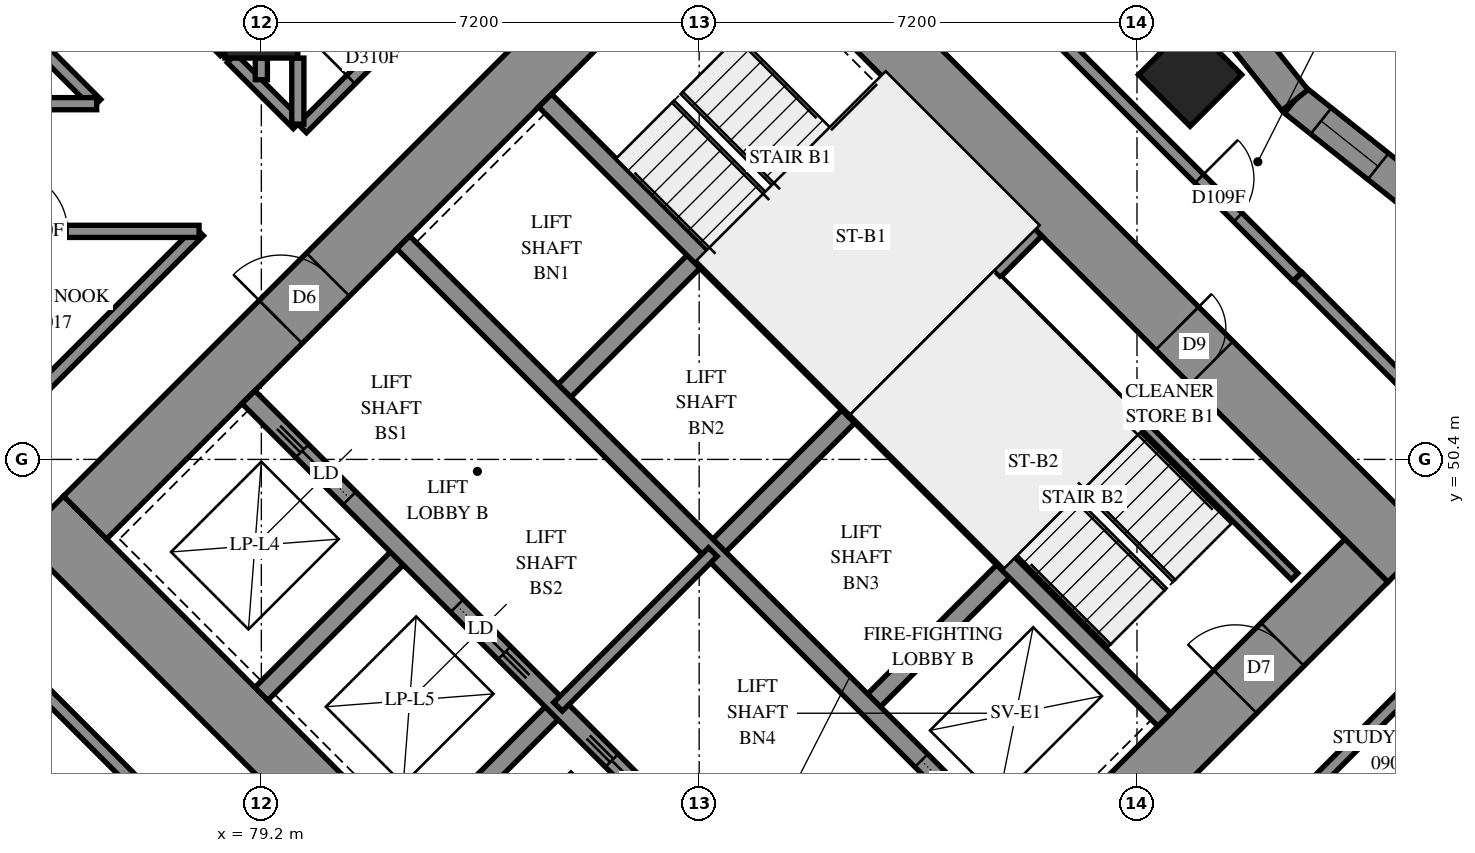
"""IFC4 building model, lengths in metres.
Left out: names, types, materials, properties, quantities, classifications, styles, units other than length and angle.
Written with IfcOpenShell. Run it as: python <this file> out.ifc"""

import sys

from ifc_helpers import new_model, si_unit, direction, frame, frame_2d, origin, origin_2d, place, context, subcontext, project, spatial, polyline, rectangle, outline, extrude, element, fill, save


model = new_model("IFC4")
c1 = context("Model", 3, precision=1e-05, world=origin(), true_north=direction((0.0, 1.0)))
c2 = subcontext(c1, "Body", "Model", "MODEL_VIEW")
j1 = project(units=[si_unit("LENGTHUNIT", "METRE"), si_unit("PLANEANGLEUNIT", "RADIAN")], contexts=[c1])
p1 = place(None, origin())
s1 = spatial("IfcSite", under=j1, at=p1, CompositionType="ELEMENT")
p2 = place(p1, origin())
s2 = spatial("IfcBuilding", under=s1, at=p2, CompositionType="ELEMENT")
p3 = place(p2, frame((0.0, 0.0, 37.2)))
s3 = spatial("IfcBuildingStorey", under=s2, at=p3, CompositionType="ELEMENT", Elevation=37.2)
for number, where, z_axis, x_axis in (
    (1, (79.2, 57.6, 0.0), (0.0, 0.0, 1.0), (1.0, 0.0, 0.0)),
    (2, (94.474, 56.727, 0.0), (0.0, 0.0, 1.0), (0.707, -0.707, 0.0)),
):
    element("IfcColumn", number, at=place(p3, frame(where, z_axis=z_axis, x_axis=x_axis)), inside=s3, PredefinedType="COLUMN", context=c2, shape_type="SweptSolid", body=[
        extrude(rectangle(XDim=1.2, YDim=1.2, at=origin_2d()), origin(), (0.0, 0.0, 1.0), 3.1),
    ])
p4 = place(p3, frame((75.594, 49.443, -0.3), z_axis=(0.0, 0.0, 1.0), x_axis=(0.7071037324, -0.70710983, 0.0)))
e3 = element("IfcWall", 3, at=p4, inside=s3, PredefinedType="SHEAR", context=c2, shape_type="SweptSolid", body=[
    extrude(rectangle(XDim=16.4, YDim=1.0, at=frame_2d((8.2, 0.0))), origin(), (0.0, 0.0, 1.0), 2.7),
])
p5 = place(p3, frame((86.483, 60.333, -0.3), z_axis=(0.0, 0.0, 1.0), x_axis=(0.70710983, -0.7071037324, 0.0)))
e4 = element("IfcWall", 4, at=p5, inside=s3, PredefinedType="SHEAR", context=c2, shape_type="SweptSolid", body=[
    extrude(rectangle(XDim=16.4, YDim=1.0, at=frame_2d((8.2, 0.0))), origin(), (0.0, 0.0, 1.0), 2.7),
])
p6 = place(p5, frame((11.0, 0.0, 0.3)))
e5 = element("IfcOpeningElement", 5, at=p6, cuts=e4, PredefinedType="OPENING", context=c2, shape_type="SweptSolid", body=[
    extrude(rectangle(XDim=0.8, YDim=2.1, at=frame_2d((0.4, 1.05))), frame((0.0, 0.51, 0.0), z_axis=(0.0, -1.0, 0.0), x_axis=(1.0, 0.0, 0.0)), (0.0, 0.0, 1.0), 1.02),
])
p7 = place(p3, frame((76.301, 49.443, -0.3), z_axis=(0.0, 0.0, 1.0), x_axis=(0.7071067812, 0.7071067812, 0.0)))
e6 = element("IfcWall", 6, at=p7, inside=s3, PredefinedType="SHEAR", context=c2, shape_type="SweptSolid", body=[
    extrude(rectangle(XDim=14.4, YDim=1.0, at=frame_2d((7.2, 0.0))), origin(), (0.0, 0.0, 1.0), 2.7),
])
p8 = place(p7, frame((4.55, 0.0, 0.3)))
e7 = element("IfcOpeningElement", 7, at=p8, cuts=e6, PredefinedType="OPENING", context=c2, shape_type="SweptSolid", body=[
    extrude(rectangle(XDim=1.1, YDim=2.1, at=frame_2d((0.55, 1.05))), frame((0.0, 0.51, 0.0), z_axis=(0.0, -1.0, 0.0), x_axis=(1.0, 0.0, 0.0)), (0.0, 0.0, 1.0), 1.02),
])
p9 = place(p7, frame((11.35, 0.0, 0.3)))
e8 = element("IfcOpeningElement", 8, at=p9, cuts=e6, PredefinedType="OPENING", context=c2, shape_type="SweptSolid", body=[
    extrude(rectangle(XDim=1.1, YDim=2.1, at=frame_2d((0.55, 1.05))), frame((0.0, 0.51, 0.0), z_axis=(0.0, -1.0, 0.0), x_axis=(1.0, 0.0, 0.0)), (0.0, 0.0, 1.0), 1.02),
])
p10 = place(p3, frame((87.19, 38.554, -0.3), z_axis=(0.0, 0.0, 1.0), x_axis=(0.707103309, 0.7071102534, 0.0)))
e9 = element("IfcWall", 9, at=p10, inside=s3, PredefinedType="SHEAR", context=c2, shape_type="SweptSolid", body=[
    extrude(rectangle(XDim=14.4, YDim=1.0, at=frame_2d((7.2, 0.0))), origin(), (0.0, 0.0, 1.0), 2.7),
])
p11 = place(p10, frame((4.55, 0.0, 0.3)))
e10 = element("IfcOpeningElement", 10, at=p11, cuts=e9, PredefinedType="OPENING", context=c2, shape_type="SweptSolid", body=[
    extrude(rectangle(XDim=1.1, YDim=2.1, at=frame_2d((0.55, 1.05))), frame((0.0, 0.51, 0.0), z_axis=(0.0, -1.0, 0.0), x_axis=(1.0, 0.0, 0.0)), (0.0, 0.0, 1.0), 1.02),
])
p12 = place(p10, frame((11.35, 0.0, 0.3)))
e11 = element("IfcOpeningElement", 11, at=p12, cuts=e9, PredefinedType="OPENING", context=c2, shape_type="SweptSolid", body=[
    extrude(rectangle(XDim=1.1, YDim=2.1, at=frame_2d((0.55, 1.05))), frame((0.0, 0.51, 0.0), z_axis=(0.0, -1.0, 0.0), x_axis=(1.0, 0.0, 0.0)), (0.0, 0.0, 1.0), 1.02),
])
for number, where, z_axis, x_axis in (
    (12, (79.2, 46.544, 0.0), (0.0, 0.0, 1.0), (0.707, 0.707, 0.0)),
    (13, (84.079, 51.423, 0.0), (0.0, 0.0, 1.0), (0.707, 0.707, 0.0)),
):
    element("IfcWall", number, at=place(p3, frame(where, z_axis=z_axis, x_axis=x_axis)), inside=s3, PredefinedType="SOLIDWALL", context=c2, shape_type="SweptSolid", body=[
        extrude(rectangle(XDim=3.3, YDim=0.3, at=frame_2d((1.65, 0.0))), origin(), (0.0, 0.0, 1.0), 3.1),
    ])
p13 = place(p3, frame((81.746, 43.999, 0.0), z_axis=(0.0, 0.0, 1.0), x_axis=(0.7071067812, 0.7071067812, 0.0)))
e14 = element("IfcWall", 14, at=p13, inside=s3, PredefinedType="SOLIDWALL", context=c2, shape_type="SweptSolid", body=[
    extrude(rectangle(XDim=3.3, YDim=0.3, at=frame_2d((1.65, 0.0))), origin(), (0.0, 0.0, 1.0), 3.1),
])
for number, where, z_axis, x_axis in (
    (15, (86.625, 48.878, 0.0), (0.0, 0.0, 1.0), (0.707, 0.707, 0.0)),
    (16, (89.17, 46.332, 0.0), (0.0, 0.0, 1.0), (0.707, 0.707, 0.0)),
):
    element("IfcWall", number, at=place(p3, frame(where, z_axis=z_axis, x_axis=x_axis)), inside=s3, PredefinedType="SOLIDWALL", context=c2, shape_type="SweptSolid", body=[
        extrude(rectangle(XDim=3.3, YDim=0.3, at=frame_2d((1.65, 0.0))), origin(), (0.0, 0.0, 1.0), 3.1),
    ])
p14 = place(p3, frame((78.988, 51.423, 0.0), z_axis=(0.0, 0.0, 1.0), x_axis=(0.7071067812, -0.7071067812, 0.0)))
e17 = element("IfcWall", 17, at=p14, inside=s3, PredefinedType="SOLIDWALL", context=c2, shape_type="SweptSolid", body=[
    extrude(rectangle(XDim=14.4, YDim=0.3, at=frame_2d((7.2, 0.0))), origin(), (0.0, 0.0, 1.0), 3.1),
])
p15 = place(p14, frame((1.25, 0.0, 0.0)))
e18 = element("IfcOpeningElement", 18, at=p15, cuts=e17, PredefinedType="OPENING", context=c2, shape_type="SweptSolid", body=[
    extrude(rectangle(XDim=1.1, YDim=2.1, at=frame_2d((0.55, 1.05))), frame((0.0, 0.16, 0.0), z_axis=(0.0, -1.0, 0.0), x_axis=(1.0, 0.0, 0.0)), (0.0, 0.0, 1.0), 0.32),
])
p16 = place(p14, frame((4.85, 0.0, 0.0)))
e19 = element("IfcOpeningElement", 19, at=p16, cuts=e17, PredefinedType="OPENING", context=c2, shape_type="SweptSolid", body=[
    extrude(rectangle(XDim=1.1, YDim=2.1, at=frame_2d((0.55, 1.05))), frame((0.0, 0.16, 0.0), z_axis=(0.0, -1.0, 0.0), x_axis=(1.0, 0.0, 0.0)), (0.0, 0.0, 1.0), 0.32),
])
p17 = place(p14, frame((8.45, 0.0, 0.0)))
e20 = element("IfcOpeningElement", 20, at=p17, cuts=e17, PredefinedType="OPENING", context=c2, shape_type="SweptSolid", body=[
    extrude(rectangle(XDim=1.1, YDim=2.1, at=frame_2d((0.55, 1.05))), frame((0.0, 0.16, 0.0), z_axis=(0.0, -1.0, 0.0), x_axis=(1.0, 0.0, 0.0)), (0.0, 0.0, 1.0), 0.32),
])
p18 = place(p14, frame((12.05, 0.0, 0.0)))
e21 = element("IfcOpeningElement", 21, at=p18, cuts=e17, PredefinedType="OPENING", context=c2, shape_type="SweptSolid", body=[
    extrude(rectangle(XDim=1.1, YDim=2.1, at=frame_2d((0.55, 1.05))), frame((0.0, 0.16, 0.0), z_axis=(0.0, -1.0, 0.0), x_axis=(1.0, 0.0, 0.0)), (0.0, 0.0, 1.0), 0.32),
])
p19 = place(p3, frame((81.534, 53.969, 0.0), z_axis=(0.0, 0.0, 1.0), x_axis=(0.707103309, -0.7071102534, 0.0)))
e22 = element("IfcWall", 22, at=p19, inside=s3, PredefinedType="SOLIDWALL", context=c2, shape_type="SweptSolid", body=[
    extrude(rectangle(XDim=14.4, YDim=0.3, at=frame_2d((7.2, 0.0))), origin(), (0.0, 0.0, 1.0), 3.1),
])
p20 = place(p19, frame((12.05, 0.0, 0.0)))
e23 = element("IfcOpeningElement", 23, at=p20, cuts=e22, PredefinedType="OPENING", context=c2, shape_type="SweptSolid", body=[
    extrude(rectangle(XDim=1.1, YDim=2.1, at=frame_2d((0.55, 1.05))), frame((0.0, 0.16, 0.0), z_axis=(0.0, -1.0, 0.0), x_axis=(1.0, 0.0, 0.0)), (0.0, 0.0, 1.0), 0.32),
])
for number, where, z_axis, x_axis in (
    (24, (83.867, 56.302, 0.0), (0.0, 0.0, 1.0), (0.707, -0.707, 0.0)),
    (25, (88.958, 51.211, 0.0), (0.0, 0.0, 1.0), (0.707, -0.707, 0.0)),
):
    element("IfcWall", number, at=place(p3, frame(where, z_axis=z_axis, x_axis=x_axis)), inside=s3, PredefinedType="SOLIDWALL", context=c2, shape_type="SweptSolid", body=[
        extrude(rectangle(XDim=7.2, YDim=0.3, at=frame_2d((3.6, 0.0))), origin(), (0.0, 0.0, 1.0), 3.1),
    ])
p21 = place(p3, frame((88.958, 51.211, 0.0), z_axis=(0.0, 0.0, 1.0), x_axis=(0.7071067812, 0.7071067812, 0.0)))
e26 = element("IfcWall", 26, at=p21, inside=s3, PredefinedType="SOLIDWALL", context=c2, shape_type="SweptSolid", body=[
    extrude(rectangle(XDim=4.2, YDim=0.3, at=frame_2d((2.1, 0.0))), origin(), (0.0, 0.0, 1.0), 3.1),
])
p22 = place(p3, frame((98.9, 54.158, 0.0), z_axis=(0.0, 0.0, 1.0), x_axis=(-0.7826029777, 0.6225211477, 0.0)))
e27 = element("IfcWall", 27, at=p22, inside=s3, PredefinedType="SOLIDWALL", context=c2, shape_type="SweptSolid", body=[
    extrude(outline(polyline([(-0.031, -0.275), (3.423, -0.275), (3.485, 0.275), (0.031, 0.275), (-0.031, -0.275)])), origin(), (0.0, 0.0, 1.0), 3.1),
])
p23 = place(p22, frame((1.704, 0.0, 0.5)))
e28 = element("IfcOpeningElement", 28, at=p23, cuts=e27, PredefinedType="OPENING", context=c2, shape_type="SweptSolid", body=[
    extrude(rectangle(XDim=1.2, YDim=2.45, at=frame_2d((0.6, 1.225))), frame((0.0, 0.285, 0.0), z_axis=(0.0, -1.0, 0.0), x_axis=(1.0, 0.0, 0.0)), (0.0, 0.0, 1.0), 0.57),
])
p24 = place(p3, frame((96.197, 56.308, 0.0), z_axis=(0.0, 0.0, 1.0), x_axis=(-0.6225070424, 0.7826141976, 0.0)))
e29 = element("IfcWall", 29, at=p24, inside=s3, PredefinedType="SOLIDWALL", context=c2, shape_type="SweptSolid", body=[
    extrude(outline(polyline([(0.031, -0.275), (3.485, -0.275), (3.423, 0.275), (-0.031, 0.275), (0.031, -0.275)])), origin(), (0.0, 0.0, 1.0), 3.1),
])
p25 = place(p24, frame((1.773, 0.0, 0.5)))
e30 = element("IfcOpeningElement", 30, at=p25, cuts=e29, PredefinedType="OPENING", context=c2, shape_type="SweptSolid", body=[
    extrude(rectangle(XDim=1.2, YDim=2.45, at=frame_2d((0.6, 1.225))), frame((0.0, 0.285, 0.0), z_axis=(0.0, -1.0, 0.0), x_axis=(1.0, 0.0, 0.0)), (0.0, 0.0, 1.0), 0.57),
])
p26 = place(p3, frame((91.313, 53.354, 0.0), z_axis=(0.0, 0.0, 1.0), x_axis=(0.7071140275, -0.7070995348, 0.0)))
e31 = element("IfcWall", 31, at=p26, inside=s3, PredefinedType="PARTITIONING", context=c2, shape_type="SweptSolid", body=[
    extrude(rectangle(XDim=6.9, YDim=0.15, at=frame_2d((3.45, 0.0))), origin(), (0.0, 0.0, 1.0), 3.1),
])
p27 = place(p3, frame((84.079, 46.332, 0.0), z_axis=(0.0, 0.0, 1.0), x_axis=(0.7071067812, 0.7071067812, 0.0)))
e32 = element("IfcWall", 32, at=p27, inside=s3, PredefinedType="PARTITIONING", context=c2, shape_type="SweptSolid", body=[
    extrude(rectangle(XDim=3.6, YDim=0.2, at=frame_2d((1.8, 0.0))), origin(), (0.0, 0.0, 1.0), 3.1),
])
p28 = place(p3, frame((94.367, 41.349, 0.0), z_axis=(0.0, 0.0, 1.0), x_axis=(0.7071109931, 0.7071025693, 0.0)))
e33 = element("IfcWall", 33, at=p28, inside=s3, PredefinedType="PARTITIONING", context=c2, shape_type="SweptSolid", body=[
    extrude(rectangle(XDim=11.871, YDim=0.2, at=frame_2d((5.936, 0.0))), origin(), (0.0, 0.0, 1.0), 3.1),
])
p29 = place(p3, frame((79.871, 55.843, 0.0), z_axis=(0.0, 0.0, 1.0), x_axis=(0.7071067812, 0.7071067812, 0.0)))
e34 = element("IfcWall", 34, at=p29, inside=s3, PredefinedType="PARTITIONING", context=c2, shape_type="SweptSolid", body=[
    extrude(rectangle(XDim=9.85, YDim=0.2, at=frame_2d((4.925, 0.0))), origin(), (0.0, 0.0, 1.0), 3.1),
])
p30 = place(p29, frame((1.135, 0.0, 0.0)))
e35 = element("IfcOpeningElement", 35, at=p30, cuts=e34, PredefinedType="OPENING", context=c2, shape_type="SweptSolid", body=[
    extrude(rectangle(XDim=1.0, YDim=2.1, at=frame_2d((0.5, 1.05))), frame((0.0, 0.11, 0.0), z_axis=(0.0, -1.0, 0.0), x_axis=(1.0, 0.0, 0.0)), (0.0, 0.0, 1.0), 0.22),
])
p31 = place(p3, frame((93.59, 42.126, 0.0), z_axis=(0.0, 0.0, 1.0), x_axis=(0.7071067812, 0.7071067812, 0.0)))
e36 = element("IfcWall", 36, at=p31, inside=s3, PredefinedType="PARTITIONING", context=c2, shape_type="SweptSolid", body=[
    extrude(rectangle(XDim=9.849, YDim=0.2, at=frame_2d((4.924, 0.0))), origin(), (0.0, 0.0, 1.0), 3.1),
])
p32 = place(p31, frame((0.148, 0.0, 0.0)))
e37 = element("IfcOpeningElement", 37, at=p32, cuts=e36, PredefinedType="OPENING", context=c2, shape_type="SweptSolid", body=[
    extrude(rectangle(XDim=1.0, YDim=2.1, at=frame_2d((0.5, 1.05))), frame((0.0, 0.11, 0.0), z_axis=(0.0, -1.0, 0.0), x_axis=(1.0, 0.0, 0.0)), (0.0, 0.0, 1.0), 0.22),
])
p33 = place(p3, frame((89.451, 60.189, 0.0), z_axis=(0.0, 0.0, 1.0), x_axis=(0.7071796965, -0.7070338583, 0.0)))
e38 = element("IfcWall", 38, at=p33, inside=s3, PredefinedType="PARTITIONING", context=c2, shape_type="SweptSolid", body=[
    extrude(rectangle(XDim=9.6, YDim=0.2, at=frame_2d((4.8, 0.0))), origin(), (0.0, 0.0, 1.0), 3.1),
])
p34 = place(p33, frame((7.315, 0.0, 0.0)))
e39 = element("IfcOpeningElement", 39, at=p34, cuts=e38, PredefinedType="OPENING", context=c2, shape_type="SweptSolid", body=[
    extrude(rectangle(XDim=0.9, YDim=2.1, at=frame_2d((0.45, 1.05))), frame((0.0, 0.11, 0.0), z_axis=(0.0, -1.0, 0.0), x_axis=(1.0, 0.0, 0.0)), (0.0, 0.0, 1.0), 0.22),
])
p35 = place(p3, frame((74.773, 60.935, 0.0), z_axis=(0.0, 0.0, 1.0), x_axis=(0.7071067812, -0.7071067812, 0.0)))
e40 = element("IfcWall", 40, at=p35, inside=s3, PredefinedType="PARTITIONING", context=c2, shape_type="SweptSolid", body=[
    extrude(rectangle(XDim=5.408, YDim=0.2, at=frame_2d((2.704, 0.0))), origin(), (0.0, 0.0, 1.0), 3.1),
])
p36 = place(p3, frame((74.517, 50.489, 0.0), z_axis=(0.0, 0.0, 1.0), x_axis=(0.7071067812, 0.7071067812, 0.0)))
e41 = element("IfcWall", 41, at=p36, inside=s3, PredefinedType="PARTITIONING", context=c2, shape_type="SweptSolid", body=[
    extrude(rectangle(XDim=5.176, YDim=0.2, at=frame_2d((2.588, 0.0))), origin(), (0.0, 0.0, 1.0), 3.1),
])
p37 = place(p3, frame((74.505, 47.697, 0.0), z_axis=(0.0, 0.0, 1.0), x_axis=(0.7071067812, -0.7071067812, 0.0)))
e42 = element("IfcWall", 42, at=p37, inside=s3, PredefinedType="PARTITIONING", context=c2, shape_type="SweptSolid", body=[
    extrude(rectangle(XDim=4.019, YDim=0.2, at=frame_2d((2.01, 0.0))), origin(), (0.0, 0.0, 1.0), 3.1),
])
p38 = place(p37, frame((0.215, 0.0, 0.0)))
e43 = element("IfcOpeningElement", 43, at=p38, cuts=e42, PredefinedType="OPENING", context=c2, shape_type="SweptSolid", body=[
    extrude(rectangle(XDim=1.0, YDim=2.1, at=frame_2d((0.5, 1.05))), frame((0.0, 0.11, 0.0), z_axis=(0.0, -1.0, 0.0), x_axis=(1.0, 0.0, 0.0)), (0.0, 0.0, 1.0), 0.22),
])
p39 = place(p3, frame((74.51, 54.15, 0.0), z_axis=(0.0, 0.0, 1.0), x_axis=(1.0, 0.0, 0.0)))
e44 = element("IfcWall", 44, at=p39, inside=s3, PredefinedType="PARTITIONING", context=c2, shape_type="SweptSolid", body=[
    extrude(rectangle(XDim=3.666, YDim=0.2, at=frame_2d((1.833, 0.0))), origin(), (0.0, 0.0, 1.0), 3.1),
])
p40 = place(p39, frame((0.502, 0.0, 0.0)))
e45 = element("IfcOpeningElement", 45, at=p40, cuts=e44, PredefinedType="OPENING", context=c2, shape_type="SweptSolid", body=[
    extrude(rectangle(XDim=1.0, YDim=2.1, at=frame_2d((0.5, 1.05))), frame((0.0, 0.11, 0.0), z_axis=(0.0, -1.0, 0.0), x_axis=(1.0, 0.0, 0.0)), (0.0, 0.0, 1.0), 0.22),
])
p41 = place(p3, frame((96.244, 53.406, 0.0), z_axis=(0.0, 0.0, 1.0), x_axis=(0.7068288851, -0.7073845681, 0.0)))
e46 = element("IfcWall", 46, at=p41, inside=s3, PredefinedType="PARTITIONING", context=c2, shape_type="SweptSolid", body=[
    extrude(rectangle(XDim=3.599, YDim=0.2, at=frame_2d((1.8, 0.0))), origin(), (0.0, 0.0, 1.0), 3.1),
])
p42 = place(p3, frame((74.697, 58.041, 0.0), z_axis=(0.0, 0.0, 1.0), x_axis=(0.7071067812, -0.7071067812, 0.0)))
e47 = element("IfcWall", 47, at=p42, inside=s3, PredefinedType="PARTITIONING", context=c2, shape_type="SweptSolid", body=[
    extrude(rectangle(XDim=2.534, YDim=0.2, at=frame_2d((1.267, 0.0))), origin(), (0.0, 0.0, 1.0), 3.1),
])
p43 = place(p3, frame((74.51, 56.25, 0.0), z_axis=(0.0, 0.0, 1.0), x_axis=(1.0, 0.0, 0.0)))
e48 = element("IfcWall", 48, at=p43, inside=s3, PredefinedType="PARTITIONING", context=c2, shape_type="SweptSolid", body=[
    extrude(rectangle(XDim=1.982, YDim=0.2, at=frame_2d((0.991, 0.0))), origin(), (0.0, 0.0, 1.0), 3.1),
])
p44 = place(p3, frame((78.711, 56.997, 0.0), z_axis=(0.0, 0.0, 1.0), x_axis=(0.7071067812, -0.7071067812, 0.0)))
e49 = element("IfcWall", 49, at=p44, inside=s3, PredefinedType="PARTITIONING", context=c2, shape_type="SweptSolid", body=[
    extrude(rectangle(XDim=1.536, YDim=0.2, at=frame_2d((0.768, 0.0))), origin(), (0.0, 0.0, 1.0), 3.1),
])
p45 = place(p3, frame((79.8, 55.914, 0.0), z_axis=(0.0, 0.0, 1.0), x_axis=(0.0, 1.0, 0.0)))
e50 = element("IfcWall", 50, at=p45, inside=s3, PredefinedType="PARTITIONING", context=c2, shape_type="SweptSolid", body=[
    extrude(rectangle(XDim=1.086, YDim=0.2, at=frame_2d((0.543, 0.0))), origin(), (0.0, 0.0, 1.0), 3.1),
])
p46 = place(p3, frame((79.2, 56.644, 0.0), z_axis=(0.0, 0.0, 1.0), x_axis=(0.0, 1.0, 0.0)))
e51 = element("IfcWall", 51, at=p46, inside=s3, PredefinedType="PARTITIONING", context=c2, shape_type="SweptSolid", body=[
    extrude(rectangle(XDim=0.356, YDim=0.2, at=frame_2d((0.178, 0.0))), origin(), (0.0, 0.0, 1.0), 3.1),
])
p47 = place(p23, origin())
e52 = element("IfcWindow", 52, at=p47, inside=s3, PartitioningType="SINGLE_PANEL", PredefinedType="WINDOW", context=c2, shape_type="SweptSolid", body=[
    extrude(rectangle(XDim=1.2, YDim=2.45, at=frame_2d((0.6, 1.225))), frame((0.0, 0.155, 0.0), z_axis=(0.0, -1.0, 0.0), x_axis=(1.0, 0.0, 0.0)), (0.0, 0.0, 1.0), 0.06),
])
fill(e28, e52)
p48 = place(p6, origin())
e53 = element("IfcDoor", 53, at=p48, inside=s3, OperationType="SINGLE_SWING_RIGHT", PredefinedType="DOOR", context=c2, shape_type="SweptSolid", body=[
    extrude(rectangle(XDim=0.8, YDim=2.1, at=frame_2d((0.4, 1.05))), frame((0.0, -0.44, 0.0), z_axis=(0.0, -1.0, 0.0), x_axis=(1.0, 0.0, 0.0)), (0.0, 0.0, 1.0), 0.05),
])
fill(e5, e53)
p49 = place(p8, origin())
e54 = element("IfcDoor", 54, at=p49, inside=s3, OperationType="DOUBLE_DOOR_SINGLE_SWING", PredefinedType="DOOR", context=c2, shape_type="SweptSolid", body=[
    extrude(rectangle(XDim=1.1, YDim=2.1, at=frame_2d((0.55, 1.05))), frame((0.0, 0.025, 0.0), z_axis=(0.0, -1.0, 0.0), x_axis=(1.0, 0.0, 0.0)), (0.0, 0.0, 1.0), 0.05),
])
fill(e7, e54)
p50 = place(p12, origin())
e55 = element("IfcDoor", 55, at=p50, inside=s3, OperationType="SINGLE_SWING_RIGHT", PredefinedType="DOOR", context=c2, shape_type="SweptSolid", body=[
    extrude(rectangle(XDim=1.1, YDim=2.1, at=frame_2d((0.55, 1.05))), frame((0.0, 0.025, 0.0), z_axis=(0.0, -1.0, 0.0), x_axis=(1.0, 0.0, 0.0)), (0.0, 0.0, 1.0), 0.05),
])
fill(e11, e55)
p51 = place(p15, origin())
e56 = element("IfcDoor", 56, at=p51, inside=s3, OperationType="SLIDING_TO_LEFT", PredefinedType="DOOR", context=c2, shape_type="SweptSolid", body=[
    extrude(rectangle(XDim=1.1, YDim=2.1, at=frame_2d((0.55, 1.05))), frame((0.0, 0.025, 0.0), z_axis=(0.0, -1.0, 0.0), x_axis=(1.0, 0.0, 0.0)), (0.0, 0.0, 1.0), 0.05),
])
fill(e18, e56)
p52 = place(p16, origin())
e57 = element("IfcDoor", 57, at=p52, inside=s3, OperationType="SLIDING_TO_RIGHT", PredefinedType="DOOR", context=c2, shape_type="SweptSolid", body=[
    extrude(rectangle(XDim=1.1, YDim=2.1, at=frame_2d((0.55, 1.05))), frame((0.0, 0.025, 0.0), z_axis=(0.0, -1.0, 0.0), x_axis=(1.0, 0.0, 0.0)), (0.0, 0.0, 1.0), 0.05),
])
fill(e19, e57)
p53 = place(p17, origin())
e58 = element("IfcDoor", 58, at=p53, inside=s3, OperationType="SLIDING_TO_LEFT", PredefinedType="DOOR", context=c2, shape_type="SweptSolid", body=[
    extrude(rectangle(XDim=1.1, YDim=2.1, at=frame_2d((0.55, 1.05))), frame((0.0, 0.025, 0.0), z_axis=(0.0, -1.0, 0.0), x_axis=(1.0, 0.0, 0.0)), (0.0, 0.0, 1.0), 0.05),
])
fill(e20, e58)
p54 = place(p20, origin())
e59 = element("IfcDoor", 59, at=p54, inside=s3, OperationType="SLIDING_TO_RIGHT", PredefinedType="DOOR", context=c2, shape_type="SweptSolid", body=[
    extrude(rectangle(XDim=1.1, YDim=2.1, at=frame_2d((0.55, 1.05))), frame((0.0, 0.025, 0.0), z_axis=(0.0, -1.0, 0.0), x_axis=(1.0, 0.0, 0.0)), (0.0, 0.0, 1.0), 0.05),
])
fill(e23, e59)
p55 = place(p40, origin())
e60 = element("IfcDoor", 60, at=p55, inside=s3, OperationType="SINGLE_SWING_RIGHT", PredefinedType="DOOR", context=c2, shape_type="SweptSolid", body=[
    extrude(rectangle(XDim=1.0, YDim=2.1, at=frame_2d((0.5, 1.05))), frame((0.0, 0.025, 0.0), z_axis=(0.0, -1.0, 0.0), x_axis=(1.0, 0.0, 0.0)), (0.0, 0.0, 1.0), 0.05),
])
fill(e45, e60)
p56 = place(p30, origin())
e61 = element("IfcDoor", 61, at=p56, inside=s3, OperationType="SINGLE_SWING_RIGHT", PredefinedType="DOOR", context=c2, shape_type="SweptSolid", body=[
    extrude(rectangle(XDim=1.0, YDim=2.1, at=frame_2d((0.5, 1.05))), frame((0.0, 0.025, 0.0), z_axis=(0.0, -1.0, 0.0), x_axis=(1.0, 0.0, 0.0)), (0.0, 0.0, 1.0), 0.05),
])
fill(e35, e61)
p57 = place(p34, origin())
e62 = element("IfcDoor", 62, at=p57, inside=s3, OperationType="SINGLE_SWING_LEFT", PredefinedType="DOOR", context=c2, shape_type="SweptSolid", body=[
    extrude(rectangle(XDim=0.9, YDim=2.1, at=frame_2d((0.45, 1.05))), frame((0.0, 0.025, 0.0), z_axis=(0.0, -1.0, 0.0), x_axis=(1.0, 0.0, 0.0)), (0.0, 0.0, 1.0), 0.05),
])
fill(e39, e62)
save(model, sys.argv[1])
